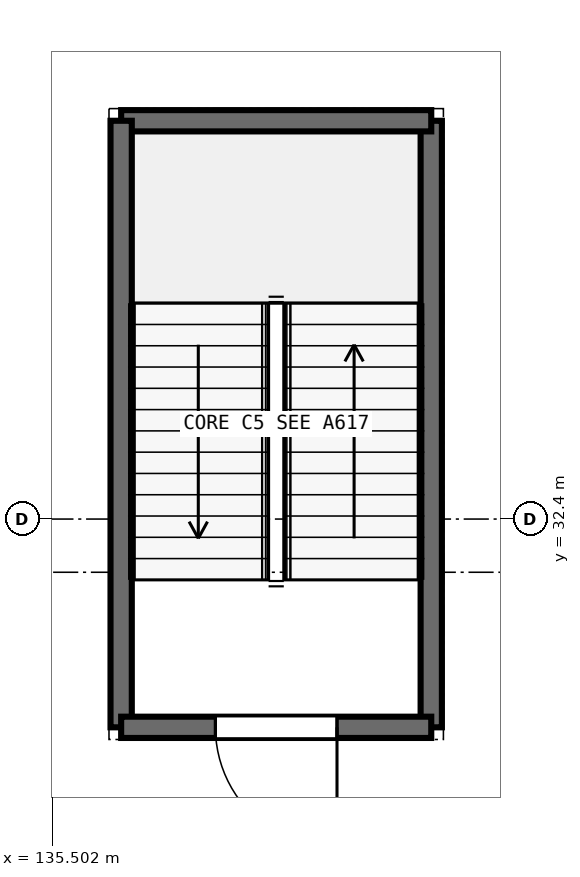
"""IFC4 building model, lengths in metres.
Left out: names, types, materials, properties, quantities, classifications, styles, units other than length and angle.
Written with IfcOpenShell. Run it as: python <this file> out.ifc"""

import sys

from ifc_helpers import new_model, si_unit, direction, frame, frame_2d, origin, place, context, subcontext, project, spatial, rectangle, extrude, element, fill, save


model = new_model("IFC4")
c1 = context("Model", 3, precision=1e-05, world=origin(), true_north=direction((0.0, 1.0)))
c2 = subcontext(c1, "Body", "Model", "MODEL_VIEW")
j1 = project(units=[si_unit("LENGTHUNIT", "METRE"), si_unit("PLANEANGLEUNIT", "RADIAN")], contexts=[c1])
p1 = place(None, origin())
s1 = spatial("IfcSite", under=j1, at=p1, CompositionType="ELEMENT")
p2 = place(p1, origin())
s2 = spatial("IfcBuilding", under=s1, at=p2, CompositionType="ELEMENT")
p3 = place(p2, frame((0.0, 0.0, -4.8)))
s3 = spatial("IfcBuildingStorey", under=s2, at=p3, CompositionType="ELEMENT", Elevation=-4.8)
p4 = place(p3, frame((140.49, 29.66, 0.0), z_axis=(0.0, 0.0, 1.0), x_axis=(0.0, 1.0, 0.0)))
e1 = element("IfcWall", 1, at=p4, inside=s3, PredefinedType="SHEAR", context=c2, shape_type="SweptSolid", body=[
    extrude(rectangle(XDim=7.98, YDim=0.28, at=frame_2d((3.99, 0.0))), origin(), (0.0, 0.0, 1.0), 4.8),
])
p5 = place(p3, frame((140.49, 37.64, 0.0), z_axis=(0.0, 0.0, 1.0), x_axis=(-1.0, 0.0, 0.0)))
e2 = element("IfcWall", 2, at=p5, inside=s3, PredefinedType="SHEAR", context=c2, shape_type="SweptSolid", body=[
    extrude(rectangle(XDim=4.08, YDim=0.28, at=frame_2d((2.04, 0.0))), origin(), (0.0, 0.0, 1.0), 4.8),
])
p6 = place(p3, frame((136.41, 37.64, 0.0), z_axis=(0.0, 0.0, 1.0), x_axis=(0.0, -1.0, 0.0)))
e3 = element("IfcWall", 3, at=p6, inside=s3, PredefinedType="SHEAR", context=c2, shape_type="SweptSolid", body=[
    extrude(rectangle(XDim=7.98, YDim=0.28, at=frame_2d((3.99, 0.0))), origin(), (0.0, 0.0, 1.0), 4.8),
])
p7 = place(p3, frame((136.41, 29.66, 0.0), z_axis=(0.0, 0.0, 1.0), x_axis=(1.0, 0.0, 0.0)))
e4 = element("IfcWall", 4, at=p7, inside=s3, PredefinedType="SHEAR", context=c2, shape_type="SweptSolid", body=[
    extrude(rectangle(XDim=4.08, YDim=0.28, at=frame_2d((2.04, 0.0))), origin(), (0.0, 0.0, 1.0), 4.8),
])
p8 = place(p7, frame((1.24, 0.0, 0.0)))
e5 = element("IfcOpeningElement", 5, at=p8, cuts=e4, PredefinedType="OPENING", context=c2, shape_type="SweptSolid", body=[
    extrude(rectangle(XDim=1.6, YDim=2.25, at=frame_2d((0.8, 1.125))), frame((0.0, 0.15, 0.0), z_axis=(0.0, -1.0, 0.0), x_axis=(1.0, 0.0, 0.0)), (0.0, 0.0, 1.0), 0.3),
])
p9 = place(p8, frame((1.6, 0.0, 0.0), z_axis=(0.0, 0.0, 1.0), x_axis=(-1.0, 0.0, 0.0)))
e6 = element("IfcDoor", 6, at=p9, inside=s3, OperationType="SINGLE_SWING_LEFT", PredefinedType="DOOR", context=c2, shape_type="SweptSolid", body=[
    extrude(rectangle(XDim=1.6, YDim=2.25, at=frame_2d((0.8, 1.125))), frame((0.0, 0.025, 0.0), z_axis=(0.0, -1.0, 0.0), x_axis=(1.0, 0.0, 0.0)), (0.0, 0.0, 1.0), 0.05),
])
fill(e5, e6)
save(model, sys.argv[1])
